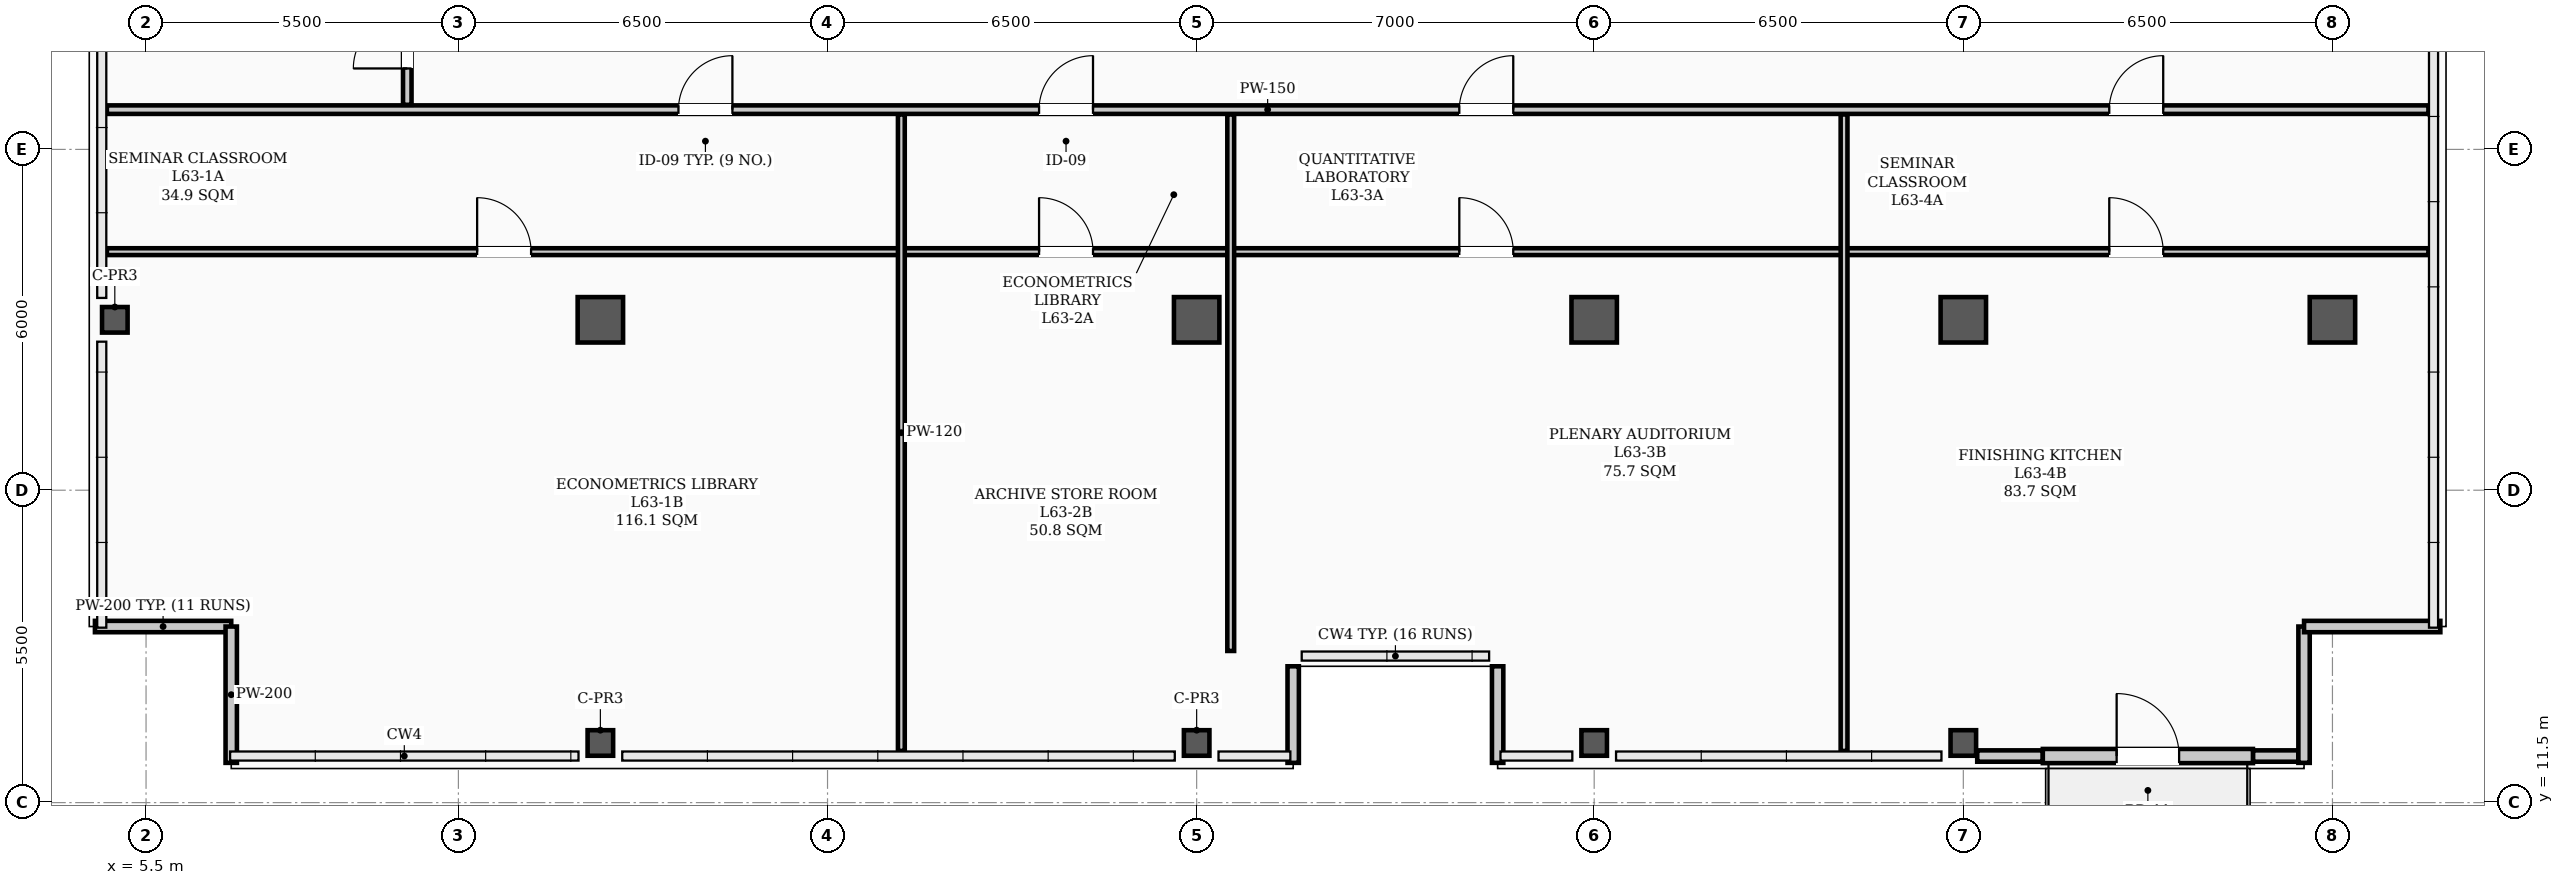
"""IFC4 building model, lengths in metres.
Left out: names, types, materials, properties, quantities, classifications, styles, units other than length and angle.
Written with IfcOpenShell. Run it as: python <this file> out.ifc"""

import sys

from ifc_helpers import new_model, si_unit, direction, frame, frame_2d, origin, origin_2d, place, context, subcontext, project, spatial, rectangle, hollow_rectangle, extrude, element, fill, save


model = new_model("IFC4")
c1 = context("Model", 3, precision=1e-05, world=origin(), true_north=direction((0.0, 1.0)))
c2 = subcontext(c1, "Body", "Model", "MODEL_VIEW")
j1 = project(units=[si_unit("LENGTHUNIT", "METRE"), si_unit("PLANEANGLEUNIT", "RADIAN")], contexts=[c1])
p1 = place(None, origin())
s1 = spatial("IfcSite", under=j1, at=p1, CompositionType="ELEMENT")
p2 = place(p1, origin())
s2 = spatial("IfcBuilding", under=s1, at=p2, CompositionType="ELEMENT")
p3 = place(p2, frame((0.0, 0.0, 254.0)))
s3 = spatial("IfcBuildingStorey", under=s2, at=p3, CompositionType="ELEMENT", Elevation=254.0)
for number, where, z_axis, x_axis in (
    (1, (13.5, 20.0, 0.0), (0.0, 0.0, 1.0), (1.0, 0.0, 0.0)),
    (2, (24.0, 20.0, 0.0), (0.0, 0.0, 1.0), (1.0, 0.0, 0.0)),
    (3, (31.0, 20.0, 0.0), (0.0, 0.0, 1.0), (1.0, 0.0, 0.0)),
    (4, (37.5, 20.0, 0.0), (0.0, 0.0, 1.0), (1.0, 0.0, 0.0)),
    (5, (44.0, 20.0, 0.0), (0.0, 0.0, 1.0), (1.0, 0.0, 0.0)),
):
    element("IfcColumn", number, at=place(p3, frame(where, z_axis=z_axis, x_axis=x_axis)), inside=s3, PredefinedType="COLUMN", context=c2, shape_type="SweptSolid", body=[
        extrude(hollow_rectangle(XDim=0.8, YDim=0.8, WallThickness=0.032, InnerFilletRadius=0.016, OuterFilletRadius=0.048, at=origin_2d()), origin(), (0.0, 0.0, 1.0), 3.9),
    ])
p4 = place(p3, frame((4.95, 20.0, 0.0), z_axis=(0.0, 0.0, 1.0), x_axis=(1.0, 0.0, 0.0)))
e6 = element("IfcColumn", 6, at=p4, inside=s3, PredefinedType="COLUMN", context=c2, shape_type="SweptSolid", body=[
    extrude(hollow_rectangle(XDim=0.45, YDim=0.45, WallThickness=0.022, InnerFilletRadius=0.022, OuterFilletRadius=0.044, at=origin_2d()), origin(), (0.0, 0.0, 1.0), 3.9),
])
for number, where, z_axis, x_axis in (
    (7, (13.5, 12.55, 0.0), (0.0, 0.0, 1.0), (1.0, 0.0, 0.0)),
    (8, (24.0, 12.55, 0.0), (0.0, 0.0, 1.0), (1.0, 0.0, 0.0)),
    (9, (31.0, 12.55, 0.0), (0.0, 0.0, 1.0), (1.0, 0.0, 0.0)),
    (10, (37.5, 12.55, 0.0), (0.0, 0.0, 1.0), (1.0, 0.0, 0.0)),
):
    element("IfcColumn", number, at=place(p3, frame(where, z_axis=z_axis, x_axis=x_axis)), inside=s3, PredefinedType="COLUMN", context=c2, shape_type="SweptSolid", body=[
        extrude(hollow_rectangle(XDim=0.45, YDim=0.45, WallThickness=0.022, InnerFilletRadius=0.022, OuterFilletRadius=0.044, at=origin_2d()), origin(), (0.0, 0.0, 1.0), 3.66),
    ])
p5 = place(p3, frame((37.745, 12.32, 0.0), z_axis=(0.0, 0.0, 1.0), x_axis=(1.0, 0.0, 0.0)))
e11 = element("IfcWall", 11, at=p5, inside=s3, PredefinedType="PARAPET", context=c2, shape_type="SweptSolid", body=[
    extrude(rectangle(XDim=1.155, YDim=0.2, at=frame_2d((0.577, 0.0))), origin(), (0.0, 0.0, 1.0), 1.2),
])
p6 = place(p3, frame((42.6, 12.32, 0.0), z_axis=(0.0, 0.0, 1.0), x_axis=(1.0, 0.0, 0.0)))
e12 = element("IfcWall", 12, at=p6, inside=s3, PredefinedType="PARAPET", context=c2, shape_type="SweptSolid", body=[
    extrude(rectangle(XDim=0.8, YDim=0.2, at=frame_2d((0.4, 0.0))), origin(), (0.0, 0.0, 1.0), 1.2),
])
p7 = place(p3, frame((4.6, 14.6, 0.0), z_axis=(0.0, 0.0, 1.0), x_axis=(1.0, 0.0, 0.0)))
e13 = element("IfcWall", 13, at=p7, inside=s3, PredefinedType="PARAPET", context=c2, shape_type="SweptSolid", body=[
    extrude(rectangle(XDim=2.4, YDim=0.2, at=frame_2d((1.2, 0.0))), origin(), (0.0, 0.0, 1.0), 1.2),
])
for number, where, z_axis, x_axis in (
    (14, (7.0, 14.6, 0.0), (0.0, 0.0, 1.0), (0.0, -1.0, 0.0)),
    (15, (43.5, 12.2, 0.0), (0.0, 0.0, 1.0), (0.0, 1.0, 0.0)),
):
    element("IfcWall", number, at=place(p3, frame(where, z_axis=z_axis, x_axis=x_axis)), inside=s3, PredefinedType="PARAPET", context=c2, shape_type="SweptSolid", body=[
        extrude(rectangle(XDim=2.4, YDim=0.2, at=frame_2d((1.2, 0.0))), origin(), (0.0, 0.0, 1.0), 1.2),
    ])
p8 = place(p3, frame((43.5, 14.6, 0.0), z_axis=(0.0, 0.0, 1.0), x_axis=(1.0, 0.0, 0.0)))
e16 = element("IfcWall", 16, at=p8, inside=s3, PredefinedType="PARAPET", context=c2, shape_type="SweptSolid", body=[
    extrude(rectangle(XDim=2.4, YDim=0.2, at=frame_2d((1.2, 0.0))), origin(), (0.0, 0.0, 1.0), 1.2),
])
for number, where, z_axis, x_axis in (
    (17, (25.7, 12.2, 0.0), (0.0, 0.0, 1.0), (0.0, 1.0, 0.0)),
    (18, (29.3, 13.9, 0.0), (0.0, 0.0, 1.0), (0.0, -1.0, 0.0)),
):
    element("IfcWall", number, at=place(p3, frame(where, z_axis=z_axis, x_axis=x_axis)), inside=s3, PredefinedType="PARAPET", context=c2, shape_type="SweptSolid", body=[
        extrude(rectangle(XDim=1.7, YDim=0.2, at=frame_2d((0.85, 0.0))), origin(), (0.0, 0.0, 1.0), 1.2),
    ])
p9 = place(p3, frame((38.9, 12.32, 0.0), z_axis=(0.0, 0.0, 1.0), x_axis=(1.0, 0.0, 0.0)))
e19 = element("IfcWall", 19, at=p9, inside=s3, PredefinedType="STANDARD", context=c2, shape_type="SweptSolid", body=[
    extrude(rectangle(XDim=3.7, YDim=0.25, at=frame_2d((1.85, 0.0))), origin(), (0.0, 0.0, 1.0), 2.22),
])
p10 = place(p9, frame((1.3, 0.0, 0.0)))
e20 = element("IfcOpeningElement", 20, at=p10, cuts=e19, PredefinedType="OPENING", context=c2, shape_type="SweptSolid", body=[
    extrude(rectangle(XDim=1.1, YDim=2.2, at=frame_2d((0.55, 1.1))), frame((0.0, 0.135, 0.0), z_axis=(0.0, -1.0, 0.0), x_axis=(1.0, 0.0, 0.0)), (0.0, 0.0, 1.0), 0.27),
])
p11 = place(p3, frame((4.81, 23.7, 0.0), z_axis=(0.0, 0.0, 1.0), x_axis=(1.0, 0.0, 0.0)))
e21 = element("IfcWall", 21, at=p11, inside=s3, PredefinedType="PARTITIONING", context=c2, shape_type="SweptSolid", body=[
    extrude(rectangle(XDim=40.88, YDim=0.15, at=frame_2d((20.44, 0.0))), origin(), (0.0, 0.0, 1.0), 2.24),
])
p12 = place(p11, frame((10.065, 0.0, 0.0)))
e22 = element("IfcOpeningElement", 22, at=p12, cuts=e21, PredefinedType="OPENING", context=c2, shape_type="SweptSolid", body=[
    extrude(rectangle(XDim=0.95, YDim=2.08, at=frame_2d((0.475, 1.04))), frame((0.0, 0.085, 0.0), z_axis=(0.0, -1.0, 0.0), x_axis=(1.0, 0.0, 0.0)), (0.0, 0.0, 1.0), 0.17),
])
p13 = place(p11, frame((16.415, 0.0, 0.0)))
e23 = element("IfcOpeningElement", 23, at=p13, cuts=e21, PredefinedType="OPENING", context=c2, shape_type="SweptSolid", body=[
    extrude(rectangle(XDim=0.95, YDim=2.08, at=frame_2d((0.475, 1.04))), frame((0.0, 0.085, 0.0), z_axis=(0.0, -1.0, 0.0), x_axis=(1.0, 0.0, 0.0)), (0.0, 0.0, 1.0), 0.17),
])
p14 = place(p11, frame((23.815, 0.0, 0.0)))
e24 = element("IfcOpeningElement", 24, at=p14, cuts=e21, PredefinedType="OPENING", context=c2, shape_type="SweptSolid", body=[
    extrude(rectangle(XDim=0.95, YDim=2.08, at=frame_2d((0.475, 1.04))), frame((0.0, 0.085, 0.0), z_axis=(0.0, -1.0, 0.0), x_axis=(1.0, 0.0, 0.0)), (0.0, 0.0, 1.0), 0.17),
])
p15 = place(p11, frame((35.26, 0.0, 0.0)))
e25 = element("IfcOpeningElement", 25, at=p15, cuts=e21, PredefinedType="OPENING", context=c2, shape_type="SweptSolid", body=[
    extrude(rectangle(XDim=0.95, YDim=2.08, at=frame_2d((0.475, 1.04))), frame((0.0, 0.085, 0.0), z_axis=(0.0, -1.0, 0.0), x_axis=(1.0, 0.0, 0.0)), (0.0, 0.0, 1.0), 0.17),
])
p16 = place(p3, frame((4.81, 21.2, 0.0), z_axis=(0.0, 0.0, 1.0), x_axis=(1.0, 0.0, 0.0)))
e26 = element("IfcWall", 26, at=p16, inside=s3, PredefinedType="PARTITIONING", context=c2, shape_type="SweptSolid", body=[
    extrude(rectangle(XDim=13.99, YDim=0.12, at=frame_2d((6.995, 0.0))), origin(), (0.0, 0.0, 1.0), 2.24),
])
p17 = place(p16, frame((6.52, 0.0, 0.0)))
e27 = element("IfcOpeningElement", 27, at=p17, cuts=e26, PredefinedType="OPENING", context=c2, shape_type="SweptSolid", body=[
    extrude(rectangle(XDim=0.95, YDim=2.08, at=frame_2d((0.475, 1.04))), frame((0.0, 0.07, 0.0), z_axis=(0.0, -1.0, 0.0), x_axis=(1.0, 0.0, 0.0)), (0.0, 0.0, 1.0), 0.14),
])
p18 = place(p3, frame((18.8, 21.2, 0.0), z_axis=(0.0, 0.0, 1.0), x_axis=(1.0, 0.0, 0.0)))
e28 = element("IfcWall", 28, at=p18, inside=s3, PredefinedType="PARTITIONING", context=c2, shape_type="SweptSolid", body=[
    extrude(rectangle(XDim=5.8, YDim=0.12, at=frame_2d((2.9, 0.0))), origin(), (0.0, 0.0, 1.0), 2.24),
])
p19 = place(p18, frame((2.425, 0.0, 0.0)))
e29 = element("IfcOpeningElement", 29, at=p19, cuts=e28, PredefinedType="OPENING", context=c2, shape_type="SweptSolid", body=[
    extrude(rectangle(XDim=0.95, YDim=2.08, at=frame_2d((0.475, 1.04))), frame((0.0, 0.07, 0.0), z_axis=(0.0, -1.0, 0.0), x_axis=(1.0, 0.0, 0.0)), (0.0, 0.0, 1.0), 0.14),
])
p20 = place(p3, frame((24.6, 21.2, 0.0), z_axis=(0.0, 0.0, 1.0), x_axis=(1.0, 0.0, 0.0)))
e30 = element("IfcWall", 30, at=p20, inside=s3, PredefinedType="PARTITIONING", context=c2, shape_type="SweptSolid", body=[
    extrude(rectangle(XDim=10.8, YDim=0.12, at=frame_2d((5.4, 0.0))), origin(), (0.0, 0.0, 1.0), 2.24),
])
p21 = place(p20, frame((4.025, 0.0, 0.0)))
e31 = element("IfcOpeningElement", 31, at=p21, cuts=e30, PredefinedType="OPENING", context=c2, shape_type="SweptSolid", body=[
    extrude(rectangle(XDim=0.95, YDim=2.08, at=frame_2d((0.475, 1.04))), frame((0.0, 0.07, 0.0), z_axis=(0.0, -1.0, 0.0), x_axis=(1.0, 0.0, 0.0)), (0.0, 0.0, 1.0), 0.14),
])
p22 = place(p3, frame((35.4, 21.2, 0.0), z_axis=(0.0, 0.0, 1.0), x_axis=(1.0, 0.0, 0.0)))
e32 = element("IfcWall", 32, at=p22, inside=s3, PredefinedType="PARTITIONING", context=c2, shape_type="SweptSolid", body=[
    extrude(rectangle(XDim=10.29, YDim=0.12, at=frame_2d((5.145, 0.0))), origin(), (0.0, 0.0, 1.0), 2.24),
])
p23 = place(p22, frame((4.67, 0.0, 0.0)))
e33 = element("IfcOpeningElement", 33, at=p23, cuts=e32, PredefinedType="OPENING", context=c2, shape_type="SweptSolid", body=[
    extrude(rectangle(XDim=0.95, YDim=2.08, at=frame_2d((0.475, 1.04))), frame((0.0, 0.07, 0.0), z_axis=(0.0, -1.0, 0.0), x_axis=(1.0, 0.0, 0.0)), (0.0, 0.0, 1.0), 0.14),
])
p24 = place(p3, frame((10.1, 23.785, 0.0), z_axis=(0.0, 0.0, 1.0), x_axis=(0.0, 1.0, 0.0)))
e34 = element("IfcWall", 34, at=p24, inside=s3, PredefinedType="PARTITIONING", context=c2, shape_type="SweptSolid", body=[
    extrude(rectangle(XDim=12.28, YDim=0.15, at=frame_2d((6.14, 0.0))), origin(), (0.0, 0.0, 1.0), 2.24),
])
p25 = place(p24, frame((0.64, 0.0, 0.0)))
e35 = element("IfcOpeningElement", 35, at=p25, cuts=e34, PredefinedType="OPENING", context=c2, shape_type="SweptSolid", body=[
    extrude(rectangle(XDim=0.95, YDim=2.08, at=frame_2d((0.475, 1.04))), frame((0.0, 0.085, 0.0), z_axis=(0.0, -1.0, 0.0), x_axis=(1.0, 0.0, 0.0)), (0.0, 0.0, 1.0), 0.17),
])
p26 = place(p3, frame((18.8, 12.41, 0.0), z_axis=(0.0, 0.0, 1.0), x_axis=(0.0, 1.0, 0.0)))
e36 = element("IfcWall", 36, at=p26, inside=s3, PredefinedType="PARTITIONING", context=c2, shape_type="SweptSolid", body=[
    extrude(rectangle(XDim=11.205, YDim=0.12, at=frame_2d((5.603, 0.0))), origin(), (0.0, 0.0, 1.0), 2.24),
])
p27 = place(p3, frame((24.6, 14.17, 0.0), z_axis=(0.0, 0.0, 1.0), x_axis=(0.0, 1.0, 0.0)))
e37 = element("IfcWall", 37, at=p27, inside=s3, PredefinedType="PARTITIONING", context=c2, shape_type="SweptSolid", body=[
    extrude(rectangle(XDim=9.445, YDim=0.12, at=frame_2d((4.723, 0.0))), origin(), (0.0, 0.0, 1.0), 2.24),
])
p28 = place(p3, frame((35.4, 12.41, 0.0), z_axis=(0.0, 0.0, 1.0), x_axis=(0.0, 1.0, 0.0)))
e38 = element("IfcWall", 38, at=p28, inside=s3, PredefinedType="PARTITIONING", context=c2, shape_type="SweptSolid", body=[
    extrude(rectangle(XDim=11.205, YDim=0.12, at=frame_2d((5.603, 0.0))), origin(), (0.0, 0.0, 1.0), 2.24),
])
p29 = place(p10, origin())
e39 = element("IfcDoor", 39, at=p29, inside=s3, OperationType="SINGLE_SWING_LEFT", PredefinedType="DOOR", context=c2, shape_type="SweptSolid", body=[
    extrude(rectangle(XDim=1.1, YDim=2.2, at=frame_2d((0.55, 1.1))), frame((0.0, 0.025, 0.0), z_axis=(0.0, -1.0, 0.0), x_axis=(1.0, 0.0, 0.0)), (0.0, 0.0, 1.0), 0.05),
])
fill(e20, e39)
p30 = place(p17, origin())
e40 = element("IfcDoor", 40, at=p30, inside=s3, OperationType="SINGLE_SWING_LEFT", PredefinedType="DOOR", context=c2, shape_type="SweptSolid", body=[
    extrude(rectangle(XDim=0.95, YDim=2.08, at=frame_2d((0.475, 1.04))), frame((0.0, 0.025, 0.0), z_axis=(0.0, -1.0, 0.0), x_axis=(1.0, 0.0, 0.0)), (0.0, 0.0, 1.0), 0.05),
])
fill(e27, e40)
p31 = place(p12, origin())
e41 = element("IfcDoor", 41, at=p31, inside=s3, OperationType="SINGLE_SWING_RIGHT", PredefinedType="DOOR", context=c2, shape_type="SweptSolid", body=[
    extrude(rectangle(XDim=0.95, YDim=2.08, at=frame_2d((0.475, 1.04))), frame((0.0, 0.025, 0.0), z_axis=(0.0, -1.0, 0.0), x_axis=(1.0, 0.0, 0.0)), (0.0, 0.0, 1.0), 0.05),
])
fill(e22, e41)
p32 = place(p19, origin())
e42 = element("IfcDoor", 42, at=p32, inside=s3, OperationType="SINGLE_SWING_LEFT", PredefinedType="DOOR", context=c2, shape_type="SweptSolid", body=[
    extrude(rectangle(XDim=0.95, YDim=2.08, at=frame_2d((0.475, 1.04))), frame((0.0, 0.025, 0.0), z_axis=(0.0, -1.0, 0.0), x_axis=(1.0, 0.0, 0.0)), (0.0, 0.0, 1.0), 0.05),
])
fill(e29, e42)
p33 = place(p13, origin())
e43 = element("IfcDoor", 43, at=p33, inside=s3, OperationType="SINGLE_SWING_RIGHT", PredefinedType="DOOR", context=c2, shape_type="SweptSolid", body=[
    extrude(rectangle(XDim=0.95, YDim=2.08, at=frame_2d((0.475, 1.04))), frame((0.0, 0.025, 0.0), z_axis=(0.0, -1.0, 0.0), x_axis=(1.0, 0.0, 0.0)), (0.0, 0.0, 1.0), 0.05),
])
fill(e23, e43)
p34 = place(p21, origin())
e44 = element("IfcDoor", 44, at=p34, inside=s3, OperationType="SINGLE_SWING_LEFT", PredefinedType="DOOR", context=c2, shape_type="SweptSolid", body=[
    extrude(rectangle(XDim=0.95, YDim=2.08, at=frame_2d((0.475, 1.04))), frame((0.0, 0.025, 0.0), z_axis=(0.0, -1.0, 0.0), x_axis=(1.0, 0.0, 0.0)), (0.0, 0.0, 1.0), 0.05),
])
fill(e31, e44)
p35 = place(p14, origin())
e45 = element("IfcDoor", 45, at=p35, inside=s3, OperationType="SINGLE_SWING_RIGHT", PredefinedType="DOOR", context=c2, shape_type="SweptSolid", body=[
    extrude(rectangle(XDim=0.95, YDim=2.08, at=frame_2d((0.475, 1.04))), frame((0.0, 0.025, 0.0), z_axis=(0.0, -1.0, 0.0), x_axis=(1.0, 0.0, 0.0)), (0.0, 0.0, 1.0), 0.05),
])
fill(e24, e45)
p36 = place(p23, origin())
e46 = element("IfcDoor", 46, at=p36, inside=s3, OperationType="SINGLE_SWING_LEFT", PredefinedType="DOOR", context=c2, shape_type="SweptSolid", body=[
    extrude(rectangle(XDim=0.95, YDim=2.08, at=frame_2d((0.475, 1.04))), frame((0.0, 0.025, 0.0), z_axis=(0.0, -1.0, 0.0), x_axis=(1.0, 0.0, 0.0)), (0.0, 0.0, 1.0), 0.05),
])
fill(e33, e46)
p37 = place(p15, origin())
e47 = element("IfcDoor", 47, at=p37, inside=s3, OperationType="SINGLE_SWING_RIGHT", PredefinedType="DOOR", context=c2, shape_type="SweptSolid", body=[
    extrude(rectangle(XDim=0.95, YDim=2.08, at=frame_2d((0.475, 1.04))), frame((0.0, 0.025, 0.0), z_axis=(0.0, -1.0, 0.0), x_axis=(1.0, 0.0, 0.0)), (0.0, 0.0, 1.0), 0.05),
])
fill(e25, e47)
p38 = place(p25, origin())
e48 = element("IfcDoor", 48, at=p38, inside=s3, OperationType="SINGLE_SWING_LEFT", PredefinedType="DOOR", context=c2, shape_type="SweptSolid", body=[
    extrude(rectangle(XDim=0.95, YDim=2.08, at=frame_2d((0.475, 1.04))), frame((0.0, 0.025, 0.0), z_axis=(0.0, -1.0, 0.0), x_axis=(1.0, 0.0, 0.0)), (0.0, 0.0, 1.0), 0.05),
])
fill(e35, e48)
save(model, sys.argv[1])
